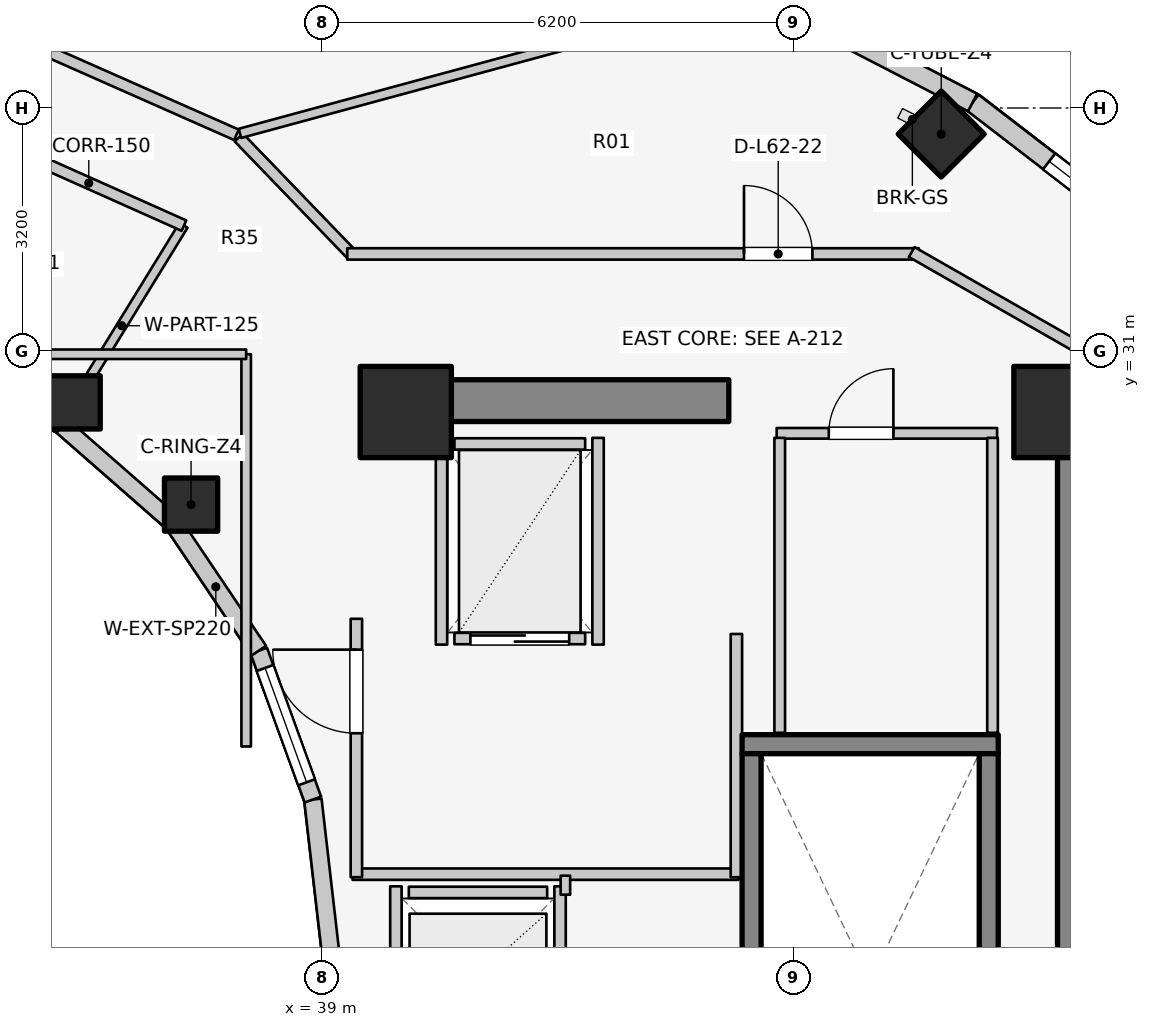
"""IFC4 building model, lengths in metres.
Left out: names, types, materials, properties, quantities, classifications, styles, units other than length and angle.
Written with IfcOpenShell. Run it as: python <this file> out.ifc"""

import sys

from ifc_helpers import new_model, si_unit, direction, frame, frame_2d, origin, origin_2d, place, context, subcontext, project, spatial, rectangle, extrude, element, fill, save


model = new_model("IFC4")
c1 = context("Model", 3, precision=1e-05, world=origin(), true_north=direction((0.0, 1.0)))
c2 = subcontext(c1, "Body", "Model", "MODEL_VIEW")
j1 = project(units=[si_unit("LENGTHUNIT", "METRE"), si_unit("PLANEANGLEUNIT", "RADIAN")], contexts=[c1])
p1 = place(None, origin())
s1 = spatial("IfcSite", under=j1, at=p1, CompositionType="ELEMENT")
p2 = place(p1, origin())
s2 = spatial("IfcBuilding", under=s1, at=p2, CompositionType="ELEMENT")
p3 = place(p2, frame((0.0, 0.0, 204.7)))
s3 = spatial("IfcBuildingStorey", under=s2, at=p3, CompositionType="ELEMENT", Elevation=204.7)
p4 = place(p3, frame((48.95, 17.05, 0.0), z_axis=(0.0, 0.0, 1.0), x_axis=(0.0, 1.0, 0.0)))
e1 = element("IfcWall", 1, at=p4, inside=s3, PredefinedType="SHEAR", context=c2, shape_type="SweptSolid", body=[
    extrude(rectangle(XDim=12.8, YDim=0.55, at=frame_2d((6.4, 0.0))), origin(), (0.0, 0.0, 1.0), 3.1),
])
p5 = place(p3, frame((39.85, 30.35, 0.0), z_axis=(0.0, 0.0, 1.0), x_axis=(1.0, 0.0, 0.0)))
e2 = element("IfcWall", 2, at=p5, inside=s3, PredefinedType="SHEAR", context=c2, shape_type="SweptSolid", body=[
    extrude(rectangle(XDim=4.5, YDim=0.55, at=frame_2d((2.25, 0.0))), origin(), (0.0, 0.0, 1.0), 3.1),
])
p6 = place(p3, frame((44.525, 25.83, 0.0), z_axis=(0.0, 0.0, 1.0), x_axis=(1.0, 0.0, 0.0)))
e3 = element("IfcWall", 3, at=p6, inside=s3, PredefinedType="SOLIDWALL", context=c2, shape_type="SweptSolid", body=[
    extrude(rectangle(XDim=3.37, YDim=0.25, at=frame_2d((1.685, 0.0))), origin(), (0.0, 0.0, 1.0), 3.1),
])
for number, where, z_axis, x_axis in (
    (4, (44.65, 17.895, 0.0), (0.0, 0.0, 1.0), (0.0, 1.0, 0.0)),
    (5, (47.77, 17.895, 0.0), (0.0, 0.0, 1.0), (0.0, 1.0, 0.0)),
):
    element("IfcWall", number, at=place(p3, frame(where, z_axis=z_axis, x_axis=x_axis)), inside=s3, PredefinedType="SOLIDWALL", context=c2, shape_type="SweptSolid", body=[
        extrude(rectangle(XDim=7.81, YDim=0.25, at=frame_2d((3.905, 0.0))), origin(), (0.0, 0.0, 1.0), 3.1),
    ])
for number, where, z_axis, x_axis in (
    (6, (48.7, 30.2, 0.0), (0.0, 0.0, 1.0), (1.0, 0.0, 0.0)),
    (7, (40.1, 30.2, 0.0), (0.0, 0.0, 1.0), (1.0, 0.0, 0.0)),
):
    element("IfcColumn", number, at=place(p3, frame(where, z_axis=z_axis, x_axis=x_axis)), inside=s3, PredefinedType="COLUMN", context=c2, shape_type="SweptSolid", body=[
        extrude(rectangle(XDim=1.2, YDim=1.2, at=origin_2d()), origin(), (0.0, 0.0, 1.0), 3.1),
    ])
p7 = place(p3, frame((37.275, 28.982, 0.0), z_axis=(0.0, 0.0, 1.0), x_axis=(1.0, 0.0, 0.0)))
e8 = element("IfcColumn", 8, at=p7, inside=s3, PredefinedType="COLUMN", context=c2, shape_type="SweptSolid", body=[
    extrude(rectangle(XDim=0.7, YDim=0.7, at=origin_2d()), origin(), (0.0, 0.0, 1.0), 3.1),
])
p8 = place(p3, frame((47.145, 33.857, 0.0), z_axis=(0.0, 0.0, 1.0), x_axis=(0.707106781187, 0.707106781187, 0.0)))
e9 = element("IfcColumn", 9, at=p8, inside=s3, PredefinedType="COLUMN", context=c2, shape_type="SweptSolid", body=[
    extrude(rectangle(XDim=0.8, YDim=0.8, at=origin_2d()), origin(), (0.0, 0.0, 1.0), 3.1),
])
p9 = place(p3, frame((35.73, 30.327, 0.0), z_axis=(0.0, 0.0, 1.0), x_axis=(1.0, 0.0, 0.0)))
e10 = element("IfcColumn", 10, at=p9, inside=s3, PredefinedType="COLUMN", context=c2, shape_type="SweptSolid", body=[
    extrude(rectangle(XDim=0.7, YDim=0.7, at=origin_2d()), origin(), (0.0, 0.0, 1.0), 3.1),
])
p10 = place(p3, frame((39.12, 23.0, 0.0), z_axis=(0.0, 0.0, 1.0), x_axis=(-0.114711713601, 0.993398823617, 0.0)))
e11 = element("IfcWall", 11, at=p10, inside=s3, PredefinedType="STANDARD", context=c2, shape_type="SweptSolid", body=[
    extrude(rectangle(XDim=2.115, YDim=0.23, at=frame_2d((1.058, 0.0))), origin(), (0.0, 0.0, 1.0), 2.84),
])
p11 = place(p3, frame((38.877, 25.102, 0.0), z_axis=(0.0, 0.0, 1.0), x_axis=(-0.341423187295, 0.93990968033, 0.0)))
e12 = element("IfcWall", 12, at=p11, inside=s3, PredefinedType="STANDARD", context=c2, shape_type="SweptSolid", body=[
    extrude(rectangle(XDim=2.084, YDim=0.23, at=frame_2d((1.042, 0.0))), origin(), (0.0, 0.0, 1.0), 2.84),
])
p12 = place(p11, frame((0.242, 0.0, 0.85)))
e13 = element("IfcOpeningElement", 13, at=p12, cuts=e12, PredefinedType="OPENING", context=c2, shape_type="SweptSolid", body=[
    extrude(rectangle(XDim=1.6, YDim=1.65, at=frame_2d((0.8, 0.825))), frame((0.0, 0.125, 0.0), z_axis=(0.0, -1.0, 0.0), x_axis=(1.0, 0.0, 0.0)), (0.0, 0.0, 1.0), 0.25),
])
p13 = place(p3, frame((38.166, 27.06, 0.0), z_axis=(0.0, 0.0, 1.0), x_axis=(-0.558197800898, 0.829707909492, 0.0)))
e14 = element("IfcWall", 14, at=p13, inside=s3, PredefinedType="STANDARD", context=c2, shape_type="SweptSolid", body=[
    extrude(rectangle(XDim=2.027, YDim=0.23, at=frame_2d((1.013, 0.0))), origin(), (0.0, 0.0, 1.0), 2.16),
])
p14 = place(p3, frame((37.035, 28.742, 0.0), z_axis=(0.0, 0.0, 1.0), x_axis=(-0.752576694707, 0.658504607869, 0.0)))
e15 = element("IfcWall", 15, at=p14, inside=s3, PredefinedType="STANDARD", context=c2, shape_type="SweptSolid", body=[
    extrude(rectangle(XDim=1.959, YDim=0.23, at=frame_2d((0.98, 0.0))), origin(), (0.0, 0.0, 1.0), 2.16),
])
p15 = place(p3, frame((35.56, 30.032, 0.0), z_axis=(0.0, 0.0, 1.0), x_axis=(-0.904179699603, 0.427152280606, 0.0)))
e16 = element("IfcWall", 16, at=p15, inside=s3, PredefinedType="STANDARD", context=c2, shape_type="SweptSolid", body=[
    extrude(rectangle(XDim=1.899, YDim=0.23, at=frame_2d((0.95, 0.0))), origin(), (0.0, 0.0, 1.0), 2.16),
])
p16 = place(p3, frame((50.761, 31.809, 0.0), z_axis=(0.0, 0.0, 1.0), x_axis=(-0.792713817907, 0.609593965603, 0.0)))
e17 = element("IfcWall", 17, at=p16, inside=s3, PredefinedType="STANDARD", context=c2, shape_type="SweptSolid", body=[
    extrude(rectangle(XDim=4.041, YDim=0.26, at=frame_2d((2.021, 0.0))), origin(), (0.0, 0.0, 1.0), 2.85),
])
p17 = place(p16, frame((1.271, 0.0, 0.75)))
e18 = element("IfcOpeningElement", 18, at=p17, cuts=e17, PredefinedType="OPENING", context=c2, shape_type="SweptSolid", body=[
    extrude(rectangle(XDim=1.5, YDim=1.6, at=frame_2d((0.75, 0.8))), frame((0.0, 0.14, 0.0), z_axis=(0.0, -1.0, 0.0), x_axis=(1.0, 0.0, 0.0)), (0.0, 0.0, 1.0), 0.28),
])
p18 = place(p3, frame((47.558, 34.272, 0.0), z_axis=(0.0, 0.0, 1.0), x_axis=(-0.88849146803, 0.458893137057, 0.0)))
e19 = element("IfcWall", 19, at=p18, inside=s3, PredefinedType="STANDARD", context=c2, shape_type="SweptSolid", body=[
    extrude(rectangle(XDim=4.15, YDim=0.26, at=frame_2d((2.075, 0.0))), origin(), (0.0, 0.0, 1.0), 2.85),
])
p19 = place(p3, frame((40.14, 23.88, 0.0), z_axis=(0.0, 0.0, 1.0), x_axis=(1.0, 0.0, 0.0)))
e20 = element("IfcWall", 20, at=p19, inside=s3, PredefinedType="SOLIDWALL", context=c2, shape_type="SweptSolid", body=[
    extrude(rectangle(XDim=1.82, YDim=0.15, at=frame_2d((0.91, 0.0))), origin(), (0.0, 0.0, 1.0), 2.12),
])
p20 = place(p3, frame((39.97, 21.64, 0.0), z_axis=(0.0, 0.0, 1.0), x_axis=(0.0, 1.0, 0.0)))
e21 = element("IfcWall", 21, at=p20, inside=s3, PredefinedType="SOLIDWALL", context=c2, shape_type="SweptSolid", body=[
    extrude(rectangle(XDim=2.32, YDim=0.15, at=frame_2d((1.16, 0.0))), origin(), (0.0, 0.0, 1.0), 2.12),
])
p21 = place(p3, frame((42.13, 21.64, 0.0), z_axis=(0.0, 0.0, 1.0), x_axis=(0.0, 1.0, 0.0)))
e22 = element("IfcWall", 22, at=p21, inside=s3, PredefinedType="SOLIDWALL", context=c2, shape_type="SweptSolid", body=[
    extrude(rectangle(XDim=2.32, YDim=0.15, at=frame_2d((1.16, 0.0))), origin(), (0.0, 0.0, 1.0), 2.855),
])
p22 = place(p3, frame((40.74, 27.22, 0.0), z_axis=(0.0, 0.0, 1.0), x_axis=(1.0, 0.0, 0.0)))
e23 = element("IfcWall", 23, at=p22, inside=s3, PredefinedType="SOLIDWALL", context=c2, shape_type="SweptSolid", body=[
    extrude(rectangle(XDim=1.72, YDim=0.15, at=frame_2d((0.86, 0.0))), origin(), (0.0, 0.0, 1.0), 2.855),
])
p23 = place(p22, frame((0.21, 0.0, 0.0)))
e24 = element("IfcOpeningElement", 24, at=p23, cuts=e23, PredefinedType="OPENING", context=c2, shape_type="SweptSolid", body=[
    extrude(rectangle(XDim=1.3, YDim=2.1, at=frame_2d((0.65, 1.05))), frame((0.0, 0.085, 0.0), z_axis=(0.0, -1.0, 0.0), x_axis=(1.0, 0.0, 0.0)), (0.0, 0.0, 1.0), 0.17),
])
p24 = place(p3, frame((40.74, 29.78, 0.0), z_axis=(0.0, 0.0, 1.0), x_axis=(1.0, 0.0, 0.0)))
e25 = element("IfcWall", 25, at=p24, inside=s3, PredefinedType="SOLIDWALL", context=c2, shape_type="SweptSolid", body=[
    extrude(rectangle(XDim=1.72, YDim=0.15, at=frame_2d((0.86, 0.0))), origin(), (0.0, 0.0, 1.0), 2.855),
])
for number, where, z_axis, x_axis in (
    (26, (40.57, 27.14, 0.0), (0.0, 0.0, 1.0), (0.0, 1.0, 0.0)),
    (27, (42.63, 27.14, 0.0), (0.0, 0.0, 1.0), (0.0, 1.0, 0.0)),
):
    element("IfcWall", number, at=place(p3, frame(where, z_axis=z_axis, x_axis=x_axis)), inside=s3, PredefinedType="SOLIDWALL", context=c2, shape_type="SweptSolid", body=[
        extrude(rectangle(XDim=2.72, YDim=0.15, at=frame_2d((1.36, 0.0))), origin(), (0.0, 0.0, 1.0), 2.855),
    ])
p25 = place(p3, frame((39.4, 24.12, 0.0), z_axis=(0.0, 0.0, 1.0), x_axis=(1.0, 0.0, 0.0)))
e28 = element("IfcWall", 28, at=p25, inside=s3, PredefinedType="PARTITIONING", context=c2, shape_type="SweptSolid", body=[
    extrude(rectangle(XDim=5.08, YDim=0.15, at=frame_2d((2.54, 0.0))), origin(), (0.0, 0.0, 1.0), 2.12),
])
p26 = place(p3, frame((44.45, 24.08, 0.0), z_axis=(0.0, 0.0, 1.0), x_axis=(0.0, 1.0, 0.0)))
e29 = element("IfcWall", 29, at=p26, inside=s3, PredefinedType="PARTITIONING", context=c2, shape_type="SweptSolid", body=[
    extrude(rectangle(XDim=3.2, YDim=0.15, at=frame_2d((1.6, 0.0))), origin(), (0.0, 0.0, 1.0), 2.855),
])
p27 = place(p3, frame((39.45, 24.08, 0.0), z_axis=(0.0, 0.0, 1.0), x_axis=(0.0, 1.0, 0.0)))
e30 = element("IfcWall", 30, at=p27, inside=s3, PredefinedType="PARTITIONING", context=c2, shape_type="SweptSolid", body=[
    extrude(rectangle(XDim=3.4, YDim=0.15, at=frame_2d((1.7, 0.0))), origin(), (0.0, 0.0, 1.0), 2.855),
])
p28 = place(p27, frame((1.894, 0.0, 0.0)))
e31 = element("IfcOpeningElement", 31, at=p28, cuts=e30, PredefinedType="OPENING", context=c2, shape_type="SweptSolid", body=[
    extrude(rectangle(XDim=1.1, YDim=2.1, at=frame_2d((0.55, 1.05))), frame((0.0, 0.085, 0.0), z_axis=(0.0, -1.0, 0.0), x_axis=(1.0, 0.0, 0.0)), (0.0, 0.0, 1.0), 0.17),
])
p29 = place(p3, frame((42.2, 23.85, 0.0), z_axis=(0.0, 0.0, 1.0), x_axis=(0.0, 1.0, 0.0)))
e32 = element("IfcWall", 32, at=p29, inside=s3, PredefinedType="PARTITIONING", context=c2, shape_type="SweptSolid", body=[
    extrude(rectangle(XDim=0.25, YDim=0.125, at=frame_2d((0.125, 0.0))), origin(), (0.0, 0.0, 1.0), 2.855),
])
p30 = place(p3, frame((44.98, 29.92, 0.0), z_axis=(0.0, 0.0, 1.0), x_axis=(1.0, 0.0, 0.0)))
e33 = element("IfcWall", 33, at=p30, inside=s3, PredefinedType="PLUMBINGWALL", context=c2, shape_type="SweptSolid", body=[
    extrude(rectangle(XDim=2.9, YDim=0.14, at=frame_2d((1.45, 0.0))), origin(), (0.0, 0.0, 1.0), 2.855),
])
p31 = place(p30, frame((0.686, 0.0, 0.0)))
e34 = element("IfcOpeningElement", 34, at=p31, cuts=e33, PredefinedType="OPENING", context=c2, shape_type="SweptSolid", body=[
    extrude(rectangle(XDim=0.85, YDim=2.05, at=frame_2d((0.425, 1.025))), frame((0.0, 0.08, 0.0), z_axis=(0.0, -1.0, 0.0), x_axis=(1.0, 0.0, 0.0)), (0.0, 0.0, 1.0), 0.16),
])
for number, where, z_axis, x_axis in (
    (35, (45.02, 25.98, 0.0), (0.0, 0.0, 1.0), (0.0, 1.0, 0.0)),
    (36, (47.82, 25.98, 0.0), (0.0, 0.0, 1.0), (0.0, 1.0, 0.0)),
):
    element("IfcWall", number, at=place(p3, frame(where, z_axis=z_axis, x_axis=x_axis)), inside=s3, PredefinedType="PLUMBINGWALL", context=c2, shape_type="SweptSolid", body=[
        extrude(rectangle(XDim=3.88, YDim=0.14, at=frame_2d((1.94, 0.0))), origin(), (0.0, 0.0, 1.0), 2.855),
    ])
p32 = place(p3, frame((35.55, 30.015, 0.0), z_axis=(0.0, 0.0, 1.0), x_axis=(0.523992004803, 0.851723182086, 0.0)))
e37 = element("IfcWall", 37, at=p32, inside=s3, PredefinedType="PARTITIONING", context=c2, shape_type="SweptSolid", body=[
    extrude(rectangle(XDim=3.101, YDim=0.125, at=frame_2d((1.551, 0.0))), origin(), (0.0, 0.0, 1.0), 2.376),
])
p33 = place(p3, frame((37.181, 32.652, 0.0), z_axis=(0.0, 0.0, 1.0), x_axis=(-0.913120130558, 0.407690602257, 0.0)))
e38 = element("IfcWall", 38, at=p33, inside=s3, PredefinedType="PARTITIONING", context=c2, shape_type="SweptSolid", body=[
    extrude(rectangle(XDim=2.743, YDim=0.15, at=frame_2d((1.371, 0.0))), origin(), (0.0, 0.0, 1.0), 2.376),
])
p34 = place(p3, frame((38.0, 25.8, 0.0), z_axis=(0.0, 0.0, 1.0), x_axis=(0.0, 1.0, 0.0)))
e39 = element("IfcWall", 39, at=p34, inside=s3, PredefinedType="PARTITIONING", context=c2, shape_type="SweptSolid", body=[
    extrude(rectangle(XDim=5.16, YDim=0.125, at=frame_2d((2.58, 0.0))), origin(), (0.0, 0.0, 1.0), 2.232),
])
p35 = place(p3, frame((35.4, 30.96, 0.0), z_axis=(0.0, 0.0, 1.0), x_axis=(1.0, 0.0, 0.0)))
e40 = element("IfcWall", 40, at=p35, inside=s3, PredefinedType="PARTITIONING", context=c2, shape_type="SweptSolid", body=[
    extrude(rectangle(XDim=2.6, YDim=0.125, at=frame_2d((1.3, 0.0))), origin(), (0.0, 0.0, 1.0), 2.376),
])
p36 = place(p3, frame((37.903, 33.812, 0.0), z_axis=(0.0, 0.0, 1.0), x_axis=(0.694032962553, -0.719943224768, 0.0)))
e41 = element("IfcWall", 41, at=p36, inside=s3, PredefinedType="PARTITIONING", context=c2, shape_type="SweptSolid", body=[
    extrude(rectangle(XDim=2.158, YDim=0.15, at=frame_2d((1.079, 0.0))), origin(), (0.0, 0.0, 1.0), 2.376),
])
p37 = place(p3, frame((39.33, 32.28, 0.0), z_axis=(0.0, 0.0, 1.0), x_axis=(1.0, 0.0, 0.0)))
e42 = element("IfcWall", 42, at=p37, inside=s3, PredefinedType="PARTITIONING", context=c2, shape_type="SweptSolid", body=[
    extrude(rectangle(XDim=7.52, YDim=0.15, at=frame_2d((3.76, 0.0))), origin(), (0.0, 0.0, 1.0), 2.376),
])
p38 = place(p37, frame((5.22, 0.0, 0.0)))
e43 = element("IfcOpeningElement", 43, at=p38, cuts=e42, PredefinedType="OPENING", context=c2, shape_type="SweptSolid", body=[
    extrude(rectangle(XDim=0.9, YDim=2.1, at=frame_2d((0.45, 1.05))), frame((0.0, 0.085, 0.0), z_axis=(0.0, -1.0, 0.0), x_axis=(1.0, 0.0, 0.0)), (0.0, 0.0, 1.0), 0.17),
])
p39 = place(p3, frame((46.757, 32.305, 0.0), z_axis=(0.0, 0.0, 1.0), x_axis=(0.867991349648, -0.496579315857, 0.0)))
e44 = element("IfcWall", 44, at=p39, inside=s3, PredefinedType="PARTITIONING", context=c2, shape_type="SweptSolid", body=[
    extrude(rectangle(XDim=2.567, YDim=0.15, at=frame_2d((1.283, 0.0))), origin(), (0.0, 0.0, 1.0), 2.22),
])
p40 = place(p3, frame((37.918, 33.866, 0.0), z_axis=(0.0, 0.0, 1.0), x_axis=(0.965109390289, 0.261847025523, 0.0)))
e45 = element("IfcWall", 45, at=p40, inside=s3, PredefinedType="PARTITIONING", context=c2, shape_type="SweptSolid", body=[
    extrude(rectangle(XDim=5.644, YDim=0.125, at=frame_2d((2.822, 0.0))), origin(), (0.0, 0.0, 1.0), 2.376),
])
p41 = place(p3, frame((37.872, 33.847, 0.0), z_axis=(0.0, 0.0, 1.0), x_axis=(-0.914490094652, 0.40460828808, 0.0)))
e46 = element("IfcWall", 46, at=p41, inside=s3, PredefinedType="PARTITIONING", context=c2, shape_type="SweptSolid", body=[
    extrude(rectangle(XDim=3.11, YDim=0.15, at=frame_2d((1.555, 0.0))), origin(), (0.0, 0.0, 1.0), 2.376),
])
p42 = place(p12, origin())
e47 = element("IfcWindow", 47, at=p42, inside=s3, PartitioningType="SINGLE_PANEL", PredefinedType="WINDOW", context=c2, shape_type="SweptSolid", body=[
    extrude(rectangle(XDim=1.6, YDim=1.65, at=frame_2d((0.8, 0.825))), frame((0.0, 0.03, 0.0), z_axis=(0.0, -1.0, 0.0), x_axis=(1.0, 0.0, 0.0)), (0.0, 0.0, 1.0), 0.06),
])
fill(e13, e47)
p43 = place(p17, origin())
e48 = element("IfcWindow", 48, at=p43, inside=s3, PartitioningType="SINGLE_PANEL", PredefinedType="WINDOW", context=c2, shape_type="SweptSolid", body=[
    extrude(rectangle(XDim=1.5, YDim=1.6, at=frame_2d((0.75, 0.8))), frame((0.0, 0.03, 0.0), z_axis=(0.0, -1.0, 0.0), x_axis=(1.0, 0.0, 0.0)), (0.0, 0.0, 1.0), 0.06),
])
fill(e18, e48)
p44 = place(p23, origin())
e49 = element("IfcDoor", 49, at=p44, inside=s3, OperationType="DOUBLE_DOOR_SLIDING", PredefinedType="DOOR", context=c2, shape_type="SweptSolid", body=[
    extrude(rectangle(XDim=1.3, YDim=2.1, at=frame_2d((0.65, 1.05))), frame((0.0, 0.025, 0.0), z_axis=(0.0, -1.0, 0.0), x_axis=(1.0, 0.0, 0.0)), (0.0, 0.0, 1.0), 0.05),
])
fill(e24, e49)
p45 = place(p28, origin())
e50 = element("IfcDoor", 50, at=p45, inside=s3, OperationType="SINGLE_SWING_RIGHT", PredefinedType="DOOR", context=c2, shape_type="SweptSolid", body=[
    extrude(rectangle(XDim=1.1, YDim=2.1, at=frame_2d((0.55, 1.05))), frame((0.0, 0.025, 0.0), z_axis=(0.0, -1.0, 0.0), x_axis=(1.0, 0.0, 0.0)), (0.0, 0.0, 1.0), 0.05),
])
fill(e31, e50)
p46 = place(p31, origin())
e51 = element("IfcDoor", 51, at=p46, inside=s3, OperationType="SINGLE_SWING_RIGHT", PredefinedType="DOOR", context=c2, shape_type="SweptSolid", body=[
    extrude(rectangle(XDim=0.85, YDim=2.05, at=frame_2d((0.425, 1.025))), frame((0.0, 0.025, 0.0), z_axis=(0.0, -1.0, 0.0), x_axis=(1.0, 0.0, 0.0)), (0.0, 0.0, 1.0), 0.05),
])
fill(e34, e51)
p47 = place(p38, origin())
e52 = element("IfcDoor", 52, at=p47, inside=s3, OperationType="SINGLE_SWING_LEFT", PredefinedType="DOOR", context=c2, shape_type="SweptSolid", body=[
    extrude(rectangle(XDim=0.9, YDim=2.1, at=frame_2d((0.45, 1.05))), frame((0.0, 0.025, 0.0), z_axis=(0.0, -1.0, 0.0), x_axis=(1.0, 0.0, 0.0)), (0.0, 0.0, 1.0), 0.05),
])
fill(e43, e52)
save(model, sys.argv[1])
